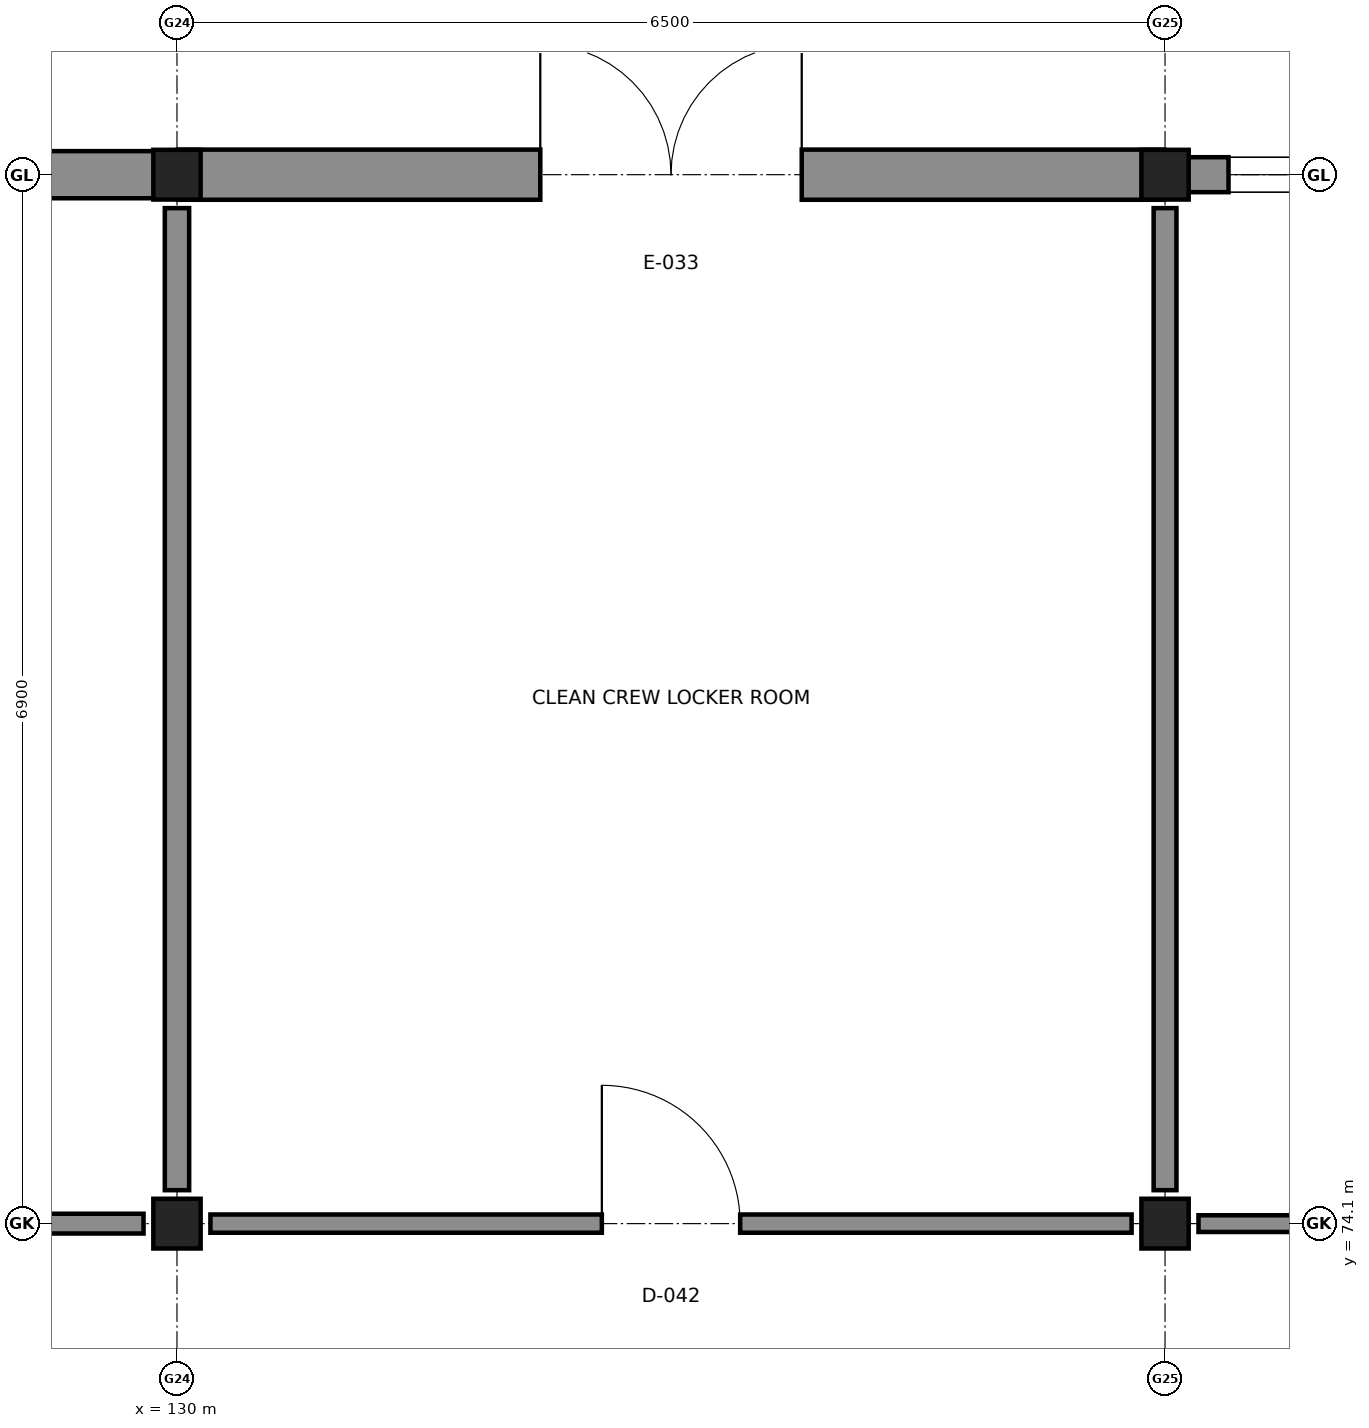
"""IFC4 building model, lengths in metres.
Left out: names, types, materials, properties, quantities, classifications, styles, units other than length and angle.
Written with IfcOpenShell. Run it as: python <this file> out.ifc"""

import sys

from ifc_helpers import new_model, si_unit, direction, frame, frame_2d, origin, origin_2d, place, context, subcontext, project, spatial, rectangle, i_section, extrude, element, fill, save


model = new_model("IFC4")
c1 = context("Model", 3, precision=1e-05, world=origin(), true_north=direction((0.0, 1.0)))
c2 = subcontext(c1, "Body", "Model", "MODEL_VIEW")
j1 = project(units=[si_unit("LENGTHUNIT", "METRE"), si_unit("PLANEANGLEUNIT", "RADIAN")], contexts=[c1])
p1 = place(None, origin())
s1 = spatial("IfcSite", under=j1, at=p1, CompositionType="ELEMENT")
p2 = place(p1, origin())
s2 = spatial("IfcBuilding", under=s1, at=p2, CompositionType="ELEMENT")
p3 = place(p2, origin())
s3 = spatial("IfcBuildingStorey", under=s2, at=p3, CompositionType="ELEMENT", Elevation=0.0)
for number, where, z_axis, x_axis in (
    (1, (130.0, 74.1, 0.0), (0.0, 0.0, 1.0), (1.0, 0.0, 0.0)),
    (2, (130.0, 81.0, 0.0), (0.0, 0.0, 1.0), (1.0, 0.0, 0.0)),
    (3, (136.5, 74.1, 0.0), (0.0, 0.0, 1.0), (1.0, 0.0, 0.0)),
    (4, (136.5, 81.0, 0.0), (0.0, 0.0, 1.0), (1.0, 0.0, 0.0)),
):
    element("IfcColumn", number, at=place(p3, frame(where, z_axis=z_axis, x_axis=x_axis)), inside=s3, PredefinedType="COLUMN", context=c2, shape_type="SweptSolid", body=[
        extrude(i_section(OverallWidth=0.311, OverallDepth=0.327, WebThickness=0.016, FlangeThickness=0.025, FilletRadius=0.017, at=origin_2d()), origin(), (0.0, 0.0, 1.0), 5.4),
    ])
p4 = place(p3, frame((123.505, 81.0, 0.0), z_axis=(0.0, 0.0, 1.0), x_axis=(1.0, 0.0, 0.0)))
e5 = element("IfcWall", 5, at=p4, inside=s3, PredefinedType="SOLIDWALL", context=c2, shape_type="SweptSolid", body=[
    extrude(rectangle(XDim=6.49, YDim=0.31, at=frame_2d((3.245, 0.0))), origin(), (0.0, 0.0, 1.0), 4.52),
])
p5 = place(p4, frame((0.512, 0.0, 0.8)))
e6 = element("IfcOpeningElement", 6, at=p5, cuts=e5, PredefinedType="OPENING", context=c2, shape_type="SweptSolid", body=[
    extrude(rectangle(XDim=2.25, YDim=1.95, at=frame_2d((1.125, 0.975))), frame((0.0, 0.165, 0.0), z_axis=(0.0, -1.0, 0.0), x_axis=(1.0, 0.0, 0.0)), (0.0, 0.0, 1.0), 0.33),
])
p6 = place(p3, frame((130.005, 81.0, 0.0), z_axis=(0.0, 0.0, 1.0), x_axis=(1.0, 0.0, 0.0)))
e7 = element("IfcWall", 7, at=p6, inside=s3, PredefinedType="SOLIDWALL", context=c2, shape_type="SweptSolid", body=[
    extrude(rectangle(XDim=6.49, YDim=0.33, at=frame_2d((3.245, 0.0))), origin(), (0.0, 0.0, 1.0), 4.52),
])
p7 = place(p6, frame((2.385, 0.0, 0.0)))
e8 = element("IfcOpeningElement", 8, at=p7, cuts=e7, PredefinedType="OPENING", context=c2, shape_type="SweptSolid", body=[
    extrude(rectangle(XDim=1.72, YDim=2.2, at=frame_2d((0.86, 1.1))), frame((0.0, 0.175, 0.0), z_axis=(0.0, -1.0, 0.0), x_axis=(1.0, 0.0, 0.0)), (0.0, 0.0, 1.0), 0.35),
])
p8 = place(p3, frame((136.505, 81.0, 0.0), z_axis=(0.0, 0.0, 1.0), x_axis=(1.0, 0.0, 0.0)))
e9 = element("IfcWall", 9, at=p8, inside=s3, PredefinedType="SOLIDWALL", context=c2, shape_type="SweptSolid", body=[
    extrude(rectangle(XDim=6.49, YDim=0.23, at=frame_2d((3.245, 0.0))), origin(), (0.0, 0.0, 1.0), 4.52),
])
p9 = place(p8, frame((0.413, 0.0, 0.8)))
e10 = element("IfcOpeningElement", 10, at=p9, cuts=e9, PredefinedType="OPENING", context=c2, shape_type="SweptSolid", body=[
    extrude(rectangle(XDim=2.45, YDim=1.95, at=frame_2d((1.225, 0.975))), frame((0.0, 0.125, 0.0), z_axis=(0.0, -1.0, 0.0), x_axis=(1.0, 0.0, 0.0)), (0.0, 0.0, 1.0), 0.25),
])
p10 = place(p3, frame((117.22, 74.1, 0.0), z_axis=(0.0, 0.0, 1.0), x_axis=(1.0, 0.0, 0.0)))
e11 = element("IfcWall", 11, at=p10, inside=s3, PredefinedType="PARTITIONING", context=c2, shape_type="SweptSolid", body=[
    extrude(rectangle(XDim=12.56, YDim=0.13, at=frame_2d((6.28, 0.0))), origin(), (0.0, 0.0, 1.0), 4.5),
])
p11 = place(p10, frame((6.59, 0.0, 0.0)))
e12 = element("IfcOpeningElement", 12, at=p11, cuts=e11, PredefinedType="OPENING", context=c2, shape_type="SweptSolid", body=[
    extrude(rectangle(XDim=0.88, YDim=2.04, at=frame_2d((0.44, 1.02))), frame((0.0, 0.075, 0.0), z_axis=(0.0, -1.0, 0.0), x_axis=(1.0, 0.0, 0.0)), (0.0, 0.0, 1.0), 0.15),
])
p12 = place(p3, frame((130.22, 74.1, 0.0), z_axis=(0.0, 0.0, 1.0), x_axis=(1.0, 0.0, 0.0)))
e13 = element("IfcWall", 13, at=p12, inside=s3, PredefinedType="PARTITIONING", context=c2, shape_type="SweptSolid", body=[
    extrude(rectangle(XDim=6.06, YDim=0.12, at=frame_2d((3.03, 0.0))), origin(), (0.0, 0.0, 1.0), 4.5),
])
p13 = place(p12, frame((2.575, 0.0, 0.0)))
e14 = element("IfcOpeningElement", 14, at=p13, cuts=e13, PredefinedType="OPENING", context=c2, shape_type="SweptSolid", body=[
    extrude(rectangle(XDim=0.91, YDim=2.06, at=frame_2d((0.455, 1.03))), frame((0.0, 0.07, 0.0), z_axis=(0.0, -1.0, 0.0), x_axis=(1.0, 0.0, 0.0)), (0.0, 0.0, 1.0), 0.14),
])
p14 = place(p3, frame((136.72, 74.1, 0.0), z_axis=(0.0, 0.0, 1.0), x_axis=(1.0, 0.0, 0.0)))
e15 = element("IfcWall", 15, at=p14, inside=s3, PredefinedType="PARTITIONING", context=c2, shape_type="SweptSolid", body=[
    extrude(rectangle(XDim=6.06, YDim=0.11, at=frame_2d((3.03, 0.0))), origin(), (0.0, 0.0, 1.0), 4.5),
])
p15 = place(p14, frame((2.56, 0.0, 0.0)))
e16 = element("IfcOpeningElement", 16, at=p15, cuts=e15, PredefinedType="OPENING", context=c2, shape_type="SweptSolid", body=[
    extrude(rectangle(XDim=0.94, YDim=2.08, at=frame_2d((0.47, 1.04))), frame((0.0, 0.065, 0.0), z_axis=(0.0, -1.0, 0.0), x_axis=(1.0, 0.0, 0.0)), (0.0, 0.0, 1.0), 0.13),
])
p16 = place(p3, frame((130.0, 74.32, 0.0), z_axis=(0.0, 0.0, 1.0), x_axis=(0.0, 1.0, 0.0)))
e17 = element("IfcWall", 17, at=p16, inside=s3, PredefinedType="PARTITIONING", context=c2, shape_type="SweptSolid", body=[
    extrude(rectangle(XDim=6.46, YDim=0.16, at=frame_2d((3.23, 0.0))), origin(), (0.0, 0.0, 1.0), 4.5),
])
p17 = place(p3, frame((136.5, 74.32, 0.0), z_axis=(0.0, 0.0, 1.0), x_axis=(0.0, 1.0, 0.0)))
e18 = element("IfcWall", 18, at=p17, inside=s3, PredefinedType="PARTITIONING", context=c2, shape_type="SweptSolid", body=[
    extrude(rectangle(XDim=6.46, YDim=0.15, at=frame_2d((3.23, 0.0))), origin(), (0.0, 0.0, 1.0), 4.5),
])
p18 = place(p7, origin())
e19 = element("IfcDoor", 19, at=p18, inside=s3, OperationType="DOUBLE_DOOR_SINGLE_SWING", PredefinedType="DOOR", context=c2, shape_type="SweptSolid", body=[
    extrude(rectangle(XDim=1.72, YDim=2.2, at=frame_2d((0.86, 1.1))), frame((0.0, 0.025, 0.0), z_axis=(0.0, -1.0, 0.0), x_axis=(1.0, 0.0, 0.0)), (0.0, 0.0, 1.0), 0.05),
])
fill(e8, e19)
p19 = place(p9, origin())
e20 = element("IfcWindow", 20, at=p19, inside=s3, PartitioningType="TRIPLE_PANEL_VERTICAL", PredefinedType="WINDOW", context=c2, shape_type="SweptSolid", body=[
    extrude(rectangle(XDim=2.45, YDim=1.95, at=frame_2d((1.225, 0.975))), frame((0.0, 0.03, 0.0), z_axis=(0.0, -1.0, 0.0), x_axis=(1.0, 0.0, 0.0)), (0.0, 0.0, 1.0), 0.06),
])
fill(e10, e20)
p20 = place(p13, origin())
e21 = element("IfcDoor", 21, at=p20, inside=s3, OperationType="SINGLE_SWING_LEFT", PredefinedType="DOOR", context=c2, shape_type="SweptSolid", body=[
    extrude(rectangle(XDim=0.91, YDim=2.06, at=frame_2d((0.455, 1.03))), frame((0.0, 0.025, 0.0), z_axis=(0.0, -1.0, 0.0), x_axis=(1.0, 0.0, 0.0)), (0.0, 0.0, 1.0), 0.05),
])
fill(e14, e21)
save(model, sys.argv[1])
